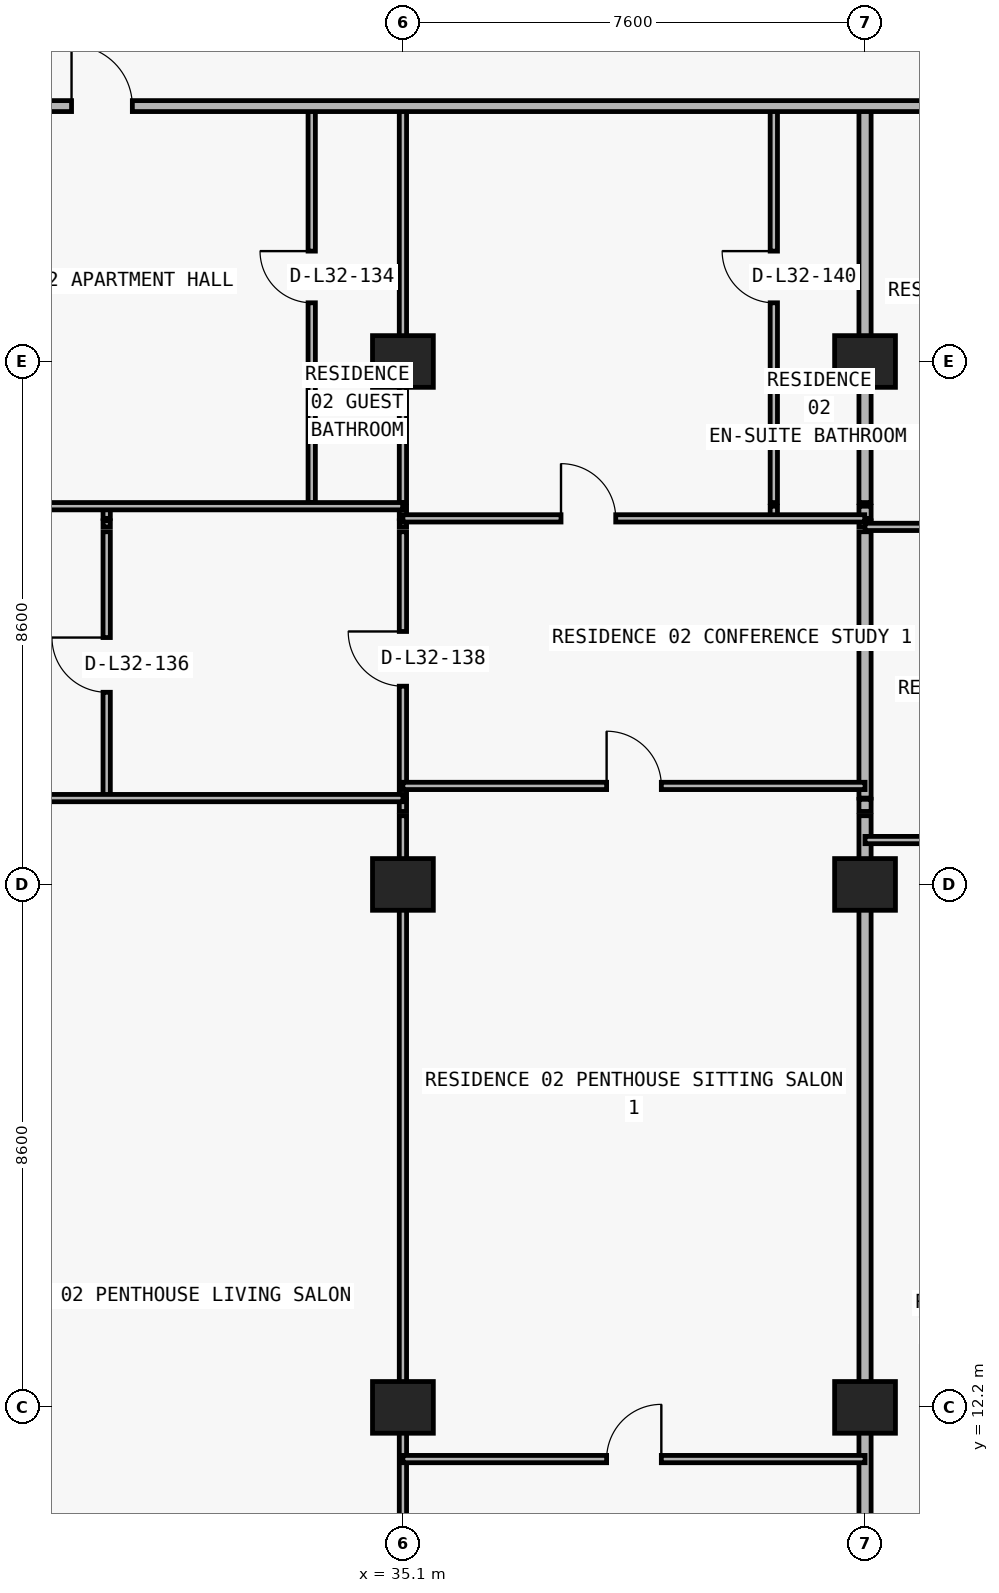
"""IFC4 building model, lengths in metres.
Left out: names, types, materials, properties, quantities, classifications, styles, units other than length and angle.
Written with IfcOpenShell. Run it as: python <this file> out.ifc"""

import sys

from ifc_helpers import new_model, si_unit, direction, frame, frame_2d, origin, origin_2d, place, context, subcontext, project, spatial, rectangle, extrude, element, fill, save


model = new_model("IFC4")
c1 = context("Model", 3, precision=1e-05, world=origin(), true_north=direction((0.0, 1.0)))
c2 = subcontext(c1, "Body", "Model", "MODEL_VIEW")
j1 = project(units=[si_unit("LENGTHUNIT", "METRE"), si_unit("PLANEANGLEUNIT", "RADIAN")], contexts=[c1])
p1 = place(None, origin())
s1 = spatial("IfcSite", under=j1, at=p1, CompositionType="ELEMENT")
p2 = place(p1, origin())
s2 = spatial("IfcBuilding", under=s1, at=p2, CompositionType="ELEMENT")
p3 = place(p2, frame((0.0, 0.0, 119.1)))
s3 = spatial("IfcBuildingStorey", under=s2, at=p3, CompositionType="ELEMENT", Elevation=119.1)
for number, where, z_axis, x_axis in (
    (1, (35.1, 12.2, 0.0), (0.0, 0.0, 1.0), (1.0, 0.0, 0.0)),
    (2, (42.7, 12.2, 0.0), (0.0, 0.0, 1.0), (1.0, 0.0, 0.0)),
    (3, (35.1, 20.8, 0.0), (0.0, 0.0, 1.0), (1.0, 0.0, 0.0)),
    (4, (42.7, 20.8, 0.0), (0.0, 0.0, 1.0), (1.0, 0.0, 0.0)),
    (5, (35.1, 29.4, 0.0), (0.0, 0.0, 1.0), (1.0, 0.0, 0.0)),
    (6, (42.7, 29.4, 0.0), (0.0, 0.0, 1.0), (1.0, 0.0, 0.0)),
):
    element("IfcColumn", number, at=place(p3, frame(where, z_axis=z_axis, x_axis=x_axis)), inside=s3, PredefinedType="COLUMN", context=c2, shape_type="SweptSolid", body=[
        extrude(rectangle(XDim=1.0, YDim=0.85, at=origin_2d()), origin(), (0.0, 0.0, 1.0), 3.05),
    ])
p4 = place(p3, frame((30.228, 22.22, 0.0), z_axis=(0.0, 0.0, 1.0), x_axis=(0.0, 1.0, 0.0)))
e7 = element("IfcWall", 7, at=p4, inside=s3, PredefinedType="PARTITIONING", context=c2, shape_type="SweptSolid", body=[
    extrude(rectangle(XDim=4.38, YDim=0.12, at=frame_2d((2.19, 0.0))), origin(), (0.0, 0.0, 1.0), 3.05),
])
p5 = place(p4, frame((1.74, 0.0, 0.0)))
e8 = element("IfcOpeningElement", 8, at=p5, cuts=e7, PredefinedType="OPENING", context=c2, shape_type="SweptSolid", body=[
    extrude(rectangle(XDim=0.9, YDim=2.15, at=frame_2d((0.45, 1.075))), frame((0.0, 0.07, 0.0), z_axis=(0.0, -1.0, 0.0), x_axis=(1.0, 0.0, 0.0)), (0.0, 0.0, 1.0), 0.14),
])
p6 = place(p3, frame((30.228, 26.68, 0.0), z_axis=(0.0, 0.0, 1.0), x_axis=(0.0, 1.0, 0.0)))
e9 = element("IfcWall", 9, at=p6, inside=s3, PredefinedType="PARTITIONING", context=c2, shape_type="SweptSolid", body=[
    extrude(rectangle(XDim=0.1, YDim=0.12, at=frame_2d((0.05, 0.0))), origin(), (0.0, 0.0, 1.0), 3.05),
])
p7 = place(p3, frame((30.228, 26.82, 0.0), z_axis=(0.0, 0.0, 1.0), x_axis=(0.0, 1.0, 0.0)))
e10 = element("IfcWall", 10, at=p7, inside=s3, PredefinedType="PARTITIONING", context=c2, shape_type="SweptSolid", body=[
    extrude(rectangle(XDim=0.2, YDim=0.12, at=frame_2d((0.1, 0.0))), origin(), (0.0, 0.0, 1.0), 3.05),
])
p8 = place(p3, frame((33.6, 27.08, 0.0), z_axis=(0.0, 0.0, 1.0), x_axis=(0.0, 1.0, 0.0)))
e11 = element("IfcWall", 11, at=p8, inside=s3, PredefinedType="PARTITIONING", context=c2, shape_type="SweptSolid", body=[
    extrude(rectangle(XDim=6.52, YDim=0.12, at=frame_2d((3.26, 0.0))), origin(), (0.0, 0.0, 1.0), 3.05),
])
p9 = place(p8, frame((3.285, 0.0, 0.0)))
e12 = element("IfcOpeningElement", 12, at=p9, cuts=e11, PredefinedType="OPENING", context=c2, shape_type="SweptSolid", body=[
    extrude(rectangle(XDim=0.85, YDim=2.1, at=frame_2d((0.425, 1.05))), frame((0.0, 0.07, 0.0), z_axis=(0.0, -1.0, 0.0), x_axis=(1.0, 0.0, 0.0)), (0.0, 0.0, 1.0), 0.14),
])
p10 = place(p3, frame((35.1, 8.84, 0.0), z_axis=(0.0, 0.0, 1.0), x_axis=(0.0, 1.0, 0.0)))
e13 = element("IfcWall", 13, at=p10, inside=s3, PredefinedType="PARTITIONING", context=c2, shape_type="SweptSolid", body=[
    extrude(rectangle(XDim=13.09, YDim=0.12, at=frame_2d((6.545, 0.0))), origin(), (0.0, 0.0, 1.0), 2.174),
])
p11 = place(p3, frame((35.1, 22.0, 0.0), z_axis=(0.0, 0.0, 1.0), x_axis=(0.0, 1.0, 0.0)))
e14 = element("IfcWall", 14, at=p11, inside=s3, PredefinedType="PARTITIONING", context=c2, shape_type="SweptSolid", body=[
    extrude(rectangle(XDim=0.2, YDim=0.12, at=frame_2d((0.1, 0.0))), origin(), (0.0, 0.0, 1.0), 2.174),
])
p12 = place(p3, frame((35.1, 22.22, 0.0), z_axis=(0.0, 0.0, 1.0), x_axis=(0.0, 1.0, 0.0)))
e15 = element("IfcWall", 15, at=p12, inside=s3, PredefinedType="PARTITIONING", context=c2, shape_type="SweptSolid", body=[
    extrude(rectangle(XDim=4.38, YDim=0.12, at=frame_2d((2.19, 0.0))), origin(), (0.0, 0.0, 1.0), 2.174),
])
p13 = place(p12, frame((1.84, 0.0, 0.0)))
e16 = element("IfcOpeningElement", 16, at=p13, cuts=e15, PredefinedType="OPENING", context=c2, shape_type="SweptSolid", body=[
    extrude(rectangle(XDim=0.9, YDim=2.124, at=frame_2d((0.45, 1.062))), frame((0.0, 0.07, 0.0), z_axis=(0.0, -1.0, 0.0), x_axis=(1.0, 0.0, 0.0)), (0.0, 0.0, 1.0), 0.14),
])
p14 = place(p3, frame((35.1, 26.68, 0.0), z_axis=(0.0, 0.0, 1.0), x_axis=(0.0, 1.0, 0.0)))
e17 = element("IfcWall", 17, at=p14, inside=s3, PredefinedType="PARTITIONING", context=c2, shape_type="SweptSolid", body=[
    extrude(rectangle(XDim=0.1, YDim=0.12, at=frame_2d((0.05, 0.0))), origin(), (0.0, 0.0, 1.0), 2.174),
])
p15 = place(p3, frame((35.1, 26.82, 0.0), z_axis=(0.0, 0.0, 1.0), x_axis=(0.0, 1.0, 0.0)))
e18 = element("IfcWall", 18, at=p15, inside=s3, PredefinedType="PARTITIONING", context=c2, shape_type="SweptSolid", body=[
    extrude(rectangle(XDim=0.2, YDim=0.12, at=frame_2d((0.1, 0.0))), origin(), (0.0, 0.0, 1.0), 2.174),
])
p16 = place(p3, frame((35.1, 27.08, 0.0), z_axis=(0.0, 0.0, 1.0), x_axis=(0.0, 1.0, 0.0)))
e19 = element("IfcWall", 19, at=p16, inside=s3, PredefinedType="PARTITIONING", context=c2, shape_type="SweptSolid", body=[
    extrude(rectangle(XDim=6.52, YDim=0.12, at=frame_2d((3.26, 0.0))), origin(), (0.0, 0.0, 1.0), 2.174),
])
p17 = place(p3, frame((41.2, 26.82, 0.0), z_axis=(0.0, 0.0, 1.0), x_axis=(0.0, 1.0, 0.0)))
e20 = element("IfcWall", 20, at=p17, inside=s3, PredefinedType="PARTITIONING", context=c2, shape_type="SweptSolid", body=[
    extrude(rectangle(XDim=0.2, YDim=0.12, at=frame_2d((0.1, 0.0))), origin(), (0.0, 0.0, 1.0), 3.05),
])
p18 = place(p3, frame((41.2, 27.08, 0.0), z_axis=(0.0, 0.0, 1.0), x_axis=(0.0, 1.0, 0.0)))
e21 = element("IfcWall", 21, at=p18, inside=s3, PredefinedType="PARTITIONING", context=c2, shape_type="SweptSolid", body=[
    extrude(rectangle(XDim=6.52, YDim=0.12, at=frame_2d((3.26, 0.0))), origin(), (0.0, 0.0, 1.0), 3.05),
])
p19 = place(p18, frame((3.285, 0.0, 0.0)))
e22 = element("IfcOpeningElement", 22, at=p19, cuts=e21, PredefinedType="OPENING", context=c2, shape_type="SweptSolid", body=[
    extrude(rectangle(XDim=0.85, YDim=2.1, at=frame_2d((0.425, 1.05))), frame((0.0, 0.07, 0.0), z_axis=(0.0, -1.0, 0.0), x_axis=(1.0, 0.0, 0.0)), (0.0, 0.0, 1.0), 0.14),
])
p20 = place(p3, frame((42.7, 8.84, 0.0), z_axis=(0.0, 0.0, 1.0), x_axis=(0.0, 1.0, 0.0)))
e23 = element("IfcWall", 23, at=p20, inside=s3, PredefinedType="PARTITIONING", context=c2, shape_type="SweptSolid", body=[
    extrude(rectangle(XDim=13.09, YDim=0.2, at=frame_2d((6.545, 0.0))), origin(), (0.0, 0.0, 1.0), 2.174),
])
p21 = place(p3, frame((42.7, 22.0, 0.0), z_axis=(0.0, 0.0, 1.0), x_axis=(0.0, 1.0, 0.0)))
e24 = element("IfcWall", 24, at=p21, inside=s3, PredefinedType="PARTITIONING", context=c2, shape_type="SweptSolid", body=[
    extrude(rectangle(XDim=0.2, YDim=0.2, at=frame_2d((0.1, 0.0))), origin(), (0.0, 0.0, 1.0), 2.174),
])
p22 = place(p3, frame((42.7, 22.22, 0.0), z_axis=(0.0, 0.0, 1.0), x_axis=(0.0, 1.0, 0.0)))
e25 = element("IfcWall", 25, at=p22, inside=s3, PredefinedType="PARTITIONING", context=c2, shape_type="SweptSolid", body=[
    extrude(rectangle(XDim=4.38, YDim=0.2, at=frame_2d((2.19, 0.0))), origin(), (0.0, 0.0, 1.0), 2.174),
])
p23 = place(p3, frame((42.7, 26.68, 0.0), z_axis=(0.0, 0.0, 1.0), x_axis=(0.0, 1.0, 0.0)))
e26 = element("IfcWall", 26, at=p23, inside=s3, PredefinedType="PARTITIONING", context=c2, shape_type="SweptSolid", body=[
    extrude(rectangle(XDim=0.1, YDim=0.2, at=frame_2d((0.05, 0.0))), origin(), (0.0, 0.0, 1.0), 2.174),
])
p24 = place(p3, frame((42.7, 26.82, 0.0), z_axis=(0.0, 0.0, 1.0), x_axis=(0.0, 1.0, 0.0)))
e27 = element("IfcWall", 27, at=p24, inside=s3, PredefinedType="PARTITIONING", context=c2, shape_type="SweptSolid", body=[
    extrude(rectangle(XDim=0.2, YDim=0.2, at=frame_2d((0.1, 0.0))), origin(), (0.0, 0.0, 1.0), 2.174),
])
p25 = place(p3, frame((42.7, 27.08, 0.0), z_axis=(0.0, 0.0, 1.0), x_axis=(0.0, 1.0, 0.0)))
e28 = element("IfcWall", 28, at=p25, inside=s3, PredefinedType="PARTITIONING", context=c2, shape_type="SweptSolid", body=[
    extrude(rectangle(XDim=6.52, YDim=0.2, at=frame_2d((3.26, 0.0))), origin(), (0.0, 0.0, 1.0), 2.174),
])
p26 = place(p3, frame((35.1, 11.35, 0.0), z_axis=(0.0, 0.0, 1.0), x_axis=(1.0, 0.0, 0.0)))
e29 = element("IfcWall", 29, at=p26, inside=s3, PredefinedType="PARTITIONING", context=c2, shape_type="SweptSolid", body=[
    extrude(rectangle(XDim=7.6, YDim=0.12, at=frame_2d((3.8, 0.0))), origin(), (0.0, 0.0, 1.0), 3.05),
])
p27 = place(p26, frame((3.35, 0.0, 0.0)))
e30 = element("IfcOpeningElement", 30, at=p27, cuts=e29, PredefinedType="OPENING", context=c2, shape_type="SweptSolid", body=[
    extrude(rectangle(XDim=0.9, YDim=2.15, at=frame_2d((0.45, 1.075))), frame((0.0, 0.07, 0.0), z_axis=(0.0, -1.0, 0.0), x_axis=(1.0, 0.0, 0.0)), (0.0, 0.0, 1.0), 0.14),
])
p28 = place(p3, frame((42.7, 21.53, 0.0), z_axis=(0.0, 0.0, 1.0), x_axis=(1.0, 0.0, 0.0)))
e31 = element("IfcWall", 31, at=p28, inside=s3, PredefinedType="PARTITIONING", context=c2, shape_type="SweptSolid", body=[
    extrude(rectangle(XDim=8.18, YDim=0.12, at=frame_2d((4.09, 0.0))), origin(), (0.0, 0.0, 1.0), 3.05),
])
p29 = place(p28, frame((1.524, 0.0, 0.0)))
e32 = element("IfcOpeningElement", 32, at=p29, cuts=e31, PredefinedType="OPENING", context=c2, shape_type="SweptSolid", body=[
    extrude(rectangle(XDim=0.9, YDim=2.15, at=frame_2d((0.45, 1.075))), frame((0.0, 0.07, 0.0), z_axis=(0.0, -1.0, 0.0), x_axis=(1.0, 0.0, 0.0)), (0.0, 0.0, 1.0), 0.14),
])
p30 = place(p28, frame((5.783, 0.0, 0.0)))
e33 = element("IfcOpeningElement", 33, at=p30, cuts=e31, PredefinedType="OPENING", context=c2, shape_type="SweptSolid", body=[
    extrude(rectangle(XDim=0.9, YDim=2.15, at=frame_2d((0.45, 1.075))), frame((0.0, 0.07, 0.0), z_axis=(0.0, -1.0, 0.0), x_axis=(1.0, 0.0, 0.0)), (0.0, 0.0, 1.0), 0.14),
])
p31 = place(p3, frame((26.92, 22.22, 0.0), z_axis=(0.0, 0.0, 1.0), x_axis=(1.0, 0.0, 0.0)))
e34 = element("IfcWall", 34, at=p31, inside=s3, PredefinedType="PARTITIONING", context=c2, shape_type="SweptSolid", body=[
    extrude(rectangle(XDim=8.18, YDim=0.12, at=frame_2d((4.09, 0.0))), origin(), (0.0, 0.0, 1.0), 3.05),
])
p32 = place(p31, frame((1.204, 0.0, 0.0)))
e35 = element("IfcOpeningElement", 35, at=p32, cuts=e34, PredefinedType="OPENING", context=c2, shape_type="SweptSolid", body=[
    extrude(rectangle(XDim=0.9, YDim=2.15, at=frame_2d((0.45, 1.075))), frame((0.0, 0.07, 0.0), z_axis=(0.0, -1.0, 0.0), x_axis=(1.0, 0.0, 0.0)), (0.0, 0.0, 1.0), 0.14),
])
p33 = place(p3, frame((35.1, 22.42, 0.0), z_axis=(0.0, 0.0, 1.0), x_axis=(1.0, 0.0, 0.0)))
e36 = element("IfcWall", 36, at=p33, inside=s3, PredefinedType="PARTITIONING", context=c2, shape_type="SweptSolid", body=[
    extrude(rectangle(XDim=7.6, YDim=0.12, at=frame_2d((3.8, 0.0))), origin(), (0.0, 0.0, 1.0), 3.05),
])
p34 = place(p33, frame((3.35, 0.0, 0.0)))
e37 = element("IfcOpeningElement", 37, at=p34, cuts=e36, PredefinedType="OPENING", context=c2, shape_type="SweptSolid", body=[
    extrude(rectangle(XDim=0.9, YDim=2.15, at=frame_2d((0.45, 1.075))), frame((0.0, 0.07, 0.0), z_axis=(0.0, -1.0, 0.0), x_axis=(1.0, 0.0, 0.0)), (0.0, 0.0, 1.0), 0.14),
])
p35 = place(p3, frame((42.7, 26.68, 0.0), z_axis=(0.0, 0.0, 1.0), x_axis=(1.0, 0.0, 0.0)))
e38 = element("IfcWall", 38, at=p35, inside=s3, PredefinedType="PARTITIONING", context=c2, shape_type="SweptSolid", body=[
    extrude(rectangle(XDim=8.18, YDim=0.12, at=frame_2d((4.09, 0.0))), origin(), (0.0, 0.0, 1.0), 3.05),
])
p36 = place(p35, frame((1.693, 0.0, 0.0)))
e39 = element("IfcOpeningElement", 39, at=p36, cuts=e38, PredefinedType="OPENING", context=c2, shape_type="SweptSolid", body=[
    extrude(rectangle(XDim=0.9, YDim=2.15, at=frame_2d((0.45, 1.075))), frame((0.0, 0.07, 0.0), z_axis=(0.0, -1.0, 0.0), x_axis=(1.0, 0.0, 0.0)), (0.0, 0.0, 1.0), 0.14),
])
p37 = place(p3, frame((35.1, 26.82, 0.0), z_axis=(0.0, 0.0, 1.0), x_axis=(1.0, 0.0, 0.0)))
e40 = element("IfcWall", 40, at=p37, inside=s3, PredefinedType="PARTITIONING", context=c2, shape_type="SweptSolid", body=[
    extrude(rectangle(XDim=7.595, YDim=0.12, at=frame_2d((3.797, 0.0))), origin(), (0.0, 0.0, 1.0), 3.05),
])
p38 = place(p37, frame((2.6, 0.0, 0.0)))
e41 = element("IfcOpeningElement", 41, at=p38, cuts=e40, PredefinedType="OPENING", context=c2, shape_type="SweptSolid", body=[
    extrude(rectangle(XDim=0.9, YDim=2.15, at=frame_2d((0.45, 1.075))), frame((0.0, 0.07, 0.0), z_axis=(0.0, -1.0, 0.0), x_axis=(1.0, 0.0, 0.0)), (0.0, 0.0, 1.0), 0.14),
])
p39 = place(p3, frame((26.92, 27.02, 0.0), z_axis=(0.0, 0.0, 1.0), x_axis=(1.0, 0.0, 0.0)))
e42 = element("IfcWall", 42, at=p39, inside=s3, PredefinedType="PARTITIONING", context=c2, shape_type="SweptSolid", body=[
    extrude(rectangle(XDim=8.175, YDim=0.12, at=frame_2d((4.087, 0.0))), origin(), (0.0, 0.0, 1.0), 3.05),
])
p40 = place(p39, frame((1.204, 0.0, 0.0)))
e43 = element("IfcOpeningElement", 43, at=p40, cuts=e42, PredefinedType="OPENING", context=c2, shape_type="SweptSolid", body=[
    extrude(rectangle(XDim=0.9, YDim=2.15, at=frame_2d((0.45, 1.075))), frame((0.0, 0.07, 0.0), z_axis=(0.0, -1.0, 0.0), x_axis=(1.0, 0.0, 0.0)), (0.0, 0.0, 1.0), 0.14),
])
p41 = place(p3, frame((18.3, 33.6, 0.0), z_axis=(0.0, 0.0, 1.0), x_axis=(1.0, 0.0, 0.0)))
e44 = element("IfcWall", 44, at=p41, inside=s3, PredefinedType="PARTITIONING", context=c2, shape_type="SweptSolid", body=[
    extrude(rectangle(XDim=41.2, YDim=0.18, at=frame_2d((20.6, 0.0))), origin(), (0.0, 0.0, 1.0), 3.05),
])
p42 = place(p41, frame((11.35, 0.0, 0.0)))
e45 = element("IfcOpeningElement", 45, at=p42, cuts=e44, PredefinedType="OPENING", context=c2, shape_type="SweptSolid", body=[
    extrude(rectangle(XDim=1.0, YDim=2.2, at=frame_2d((0.5, 1.1))), frame((0.0, 0.1, 0.0), z_axis=(0.0, -1.0, 0.0), x_axis=(1.0, 0.0, 0.0)), (0.0, 0.0, 1.0), 0.2),
])
p43 = place(p41, frame((27.275, 0.0, 0.0)))
e46 = element("IfcOpeningElement", 46, at=p43, cuts=e44, PredefinedType="OPENING", context=c2, shape_type="SweptSolid", body=[
    extrude(rectangle(XDim=1.0, YDim=2.2, at=frame_2d((0.5, 1.1))), frame((0.0, 0.1, 0.0), z_axis=(0.0, -1.0, 0.0), x_axis=(1.0, 0.0, 0.0)), (0.0, 0.0, 1.0), 0.2),
])
p44 = place(p41, frame((35.675, 0.0, 0.0)))
e47 = element("IfcOpeningElement", 47, at=p44, cuts=e44, PredefinedType="OPENING", context=c2, shape_type="SweptSolid", body=[
    extrude(rectangle(XDim=1.0, YDim=2.2, at=frame_2d((0.5, 1.1))), frame((0.0, 0.1, 0.0), z_axis=(0.0, -1.0, 0.0), x_axis=(1.0, 0.0, 0.0)), (0.0, 0.0, 1.0), 0.2),
])
p45 = place(p42, origin())
e48 = element("IfcDoor", 48, at=p45, inside=s3, OperationType="SINGLE_SWING_LEFT", PredefinedType="DOOR", context=c2, shape_type="SweptSolid", body=[
    extrude(rectangle(XDim=1.0, YDim=2.2, at=frame_2d((0.5, 1.1))), frame((0.0, 0.025, 0.0), z_axis=(0.0, -1.0, 0.0), x_axis=(1.0, 0.0, 0.0)), (0.0, 0.0, 1.0), 0.05),
])
fill(e45, e48)
p46 = place(p9, origin())
e49 = element("IfcDoor", 49, at=p46, inside=s3, OperationType="SINGLE_SWING_RIGHT", PredefinedType="DOOR", context=c2, shape_type="SweptSolid", body=[
    extrude(rectangle(XDim=0.85, YDim=2.1, at=frame_2d((0.425, 1.05))), frame((0.0, 0.025, 0.0), z_axis=(0.0, -1.0, 0.0), x_axis=(1.0, 0.0, 0.0)), (0.0, 0.0, 1.0), 0.05),
])
fill(e12, e49)
p47 = place(p5, origin())
e50 = element("IfcDoor", 50, at=p47, inside=s3, OperationType="SINGLE_SWING_RIGHT", PredefinedType="DOOR", context=c2, shape_type="SweptSolid", body=[
    extrude(rectangle(XDim=0.9, YDim=2.15, at=frame_2d((0.45, 1.075))), frame((0.0, 0.025, 0.0), z_axis=(0.0, -1.0, 0.0), x_axis=(1.0, 0.0, 0.0)), (0.0, 0.0, 1.0), 0.05),
])
fill(e8, e50)
p48 = place(p13, origin())
e51 = element("IfcDoor", 51, at=p48, inside=s3, OperationType="SINGLE_SWING_RIGHT", PredefinedType="DOOR", context=c2, shape_type="SweptSolid", body=[
    extrude(rectangle(XDim=0.9, YDim=2.124, at=frame_2d((0.45, 1.062))), frame((0.0, 0.025, 0.0), z_axis=(0.0, -1.0, 0.0), x_axis=(1.0, 0.0, 0.0)), (0.0, 0.0, 1.0), 0.05),
])
fill(e16, e51)
p49 = place(p38, origin())
e52 = element("IfcDoor", 52, at=p49, inside=s3, OperationType="SINGLE_SWING_LEFT", PredefinedType="DOOR", context=c2, shape_type="SweptSolid", body=[
    extrude(rectangle(XDim=0.9, YDim=2.15, at=frame_2d((0.45, 1.075))), frame((0.0, 0.025, 0.0), z_axis=(0.0, -1.0, 0.0), x_axis=(1.0, 0.0, 0.0)), (0.0, 0.0, 1.0), 0.05),
])
fill(e41, e52)
p50 = place(p19, origin())
e53 = element("IfcDoor", 53, at=p50, inside=s3, OperationType="SINGLE_SWING_RIGHT", PredefinedType="DOOR", context=c2, shape_type="SweptSolid", body=[
    extrude(rectangle(XDim=0.85, YDim=2.1, at=frame_2d((0.425, 1.05))), frame((0.0, 0.025, 0.0), z_axis=(0.0, -1.0, 0.0), x_axis=(1.0, 0.0, 0.0)), (0.0, 0.0, 1.0), 0.05),
])
fill(e22, e53)
p51 = place(p34, origin())
e54 = element("IfcDoor", 54, at=p51, inside=s3, OperationType="SINGLE_SWING_LEFT", PredefinedType="DOOR", context=c2, shape_type="SweptSolid", body=[
    extrude(rectangle(XDim=0.9, YDim=2.15, at=frame_2d((0.45, 1.075))), frame((0.0, 0.025, 0.0), z_axis=(0.0, -1.0, 0.0), x_axis=(1.0, 0.0, 0.0)), (0.0, 0.0, 1.0), 0.05),
])
fill(e37, e54)
p52 = place(p27, origin())
e55 = element("IfcDoor", 55, at=p52, inside=s3, OperationType="SINGLE_SWING_RIGHT", PredefinedType="DOOR", context=c2, shape_type="SweptSolid", body=[
    extrude(rectangle(XDim=0.9, YDim=2.15, at=frame_2d((0.45, 1.075))), frame((0.0, 0.025, 0.0), z_axis=(0.0, -1.0, 0.0), x_axis=(1.0, 0.0, 0.0)), (0.0, 0.0, 1.0), 0.05),
])
fill(e30, e55)
save(model, sys.argv[1])
